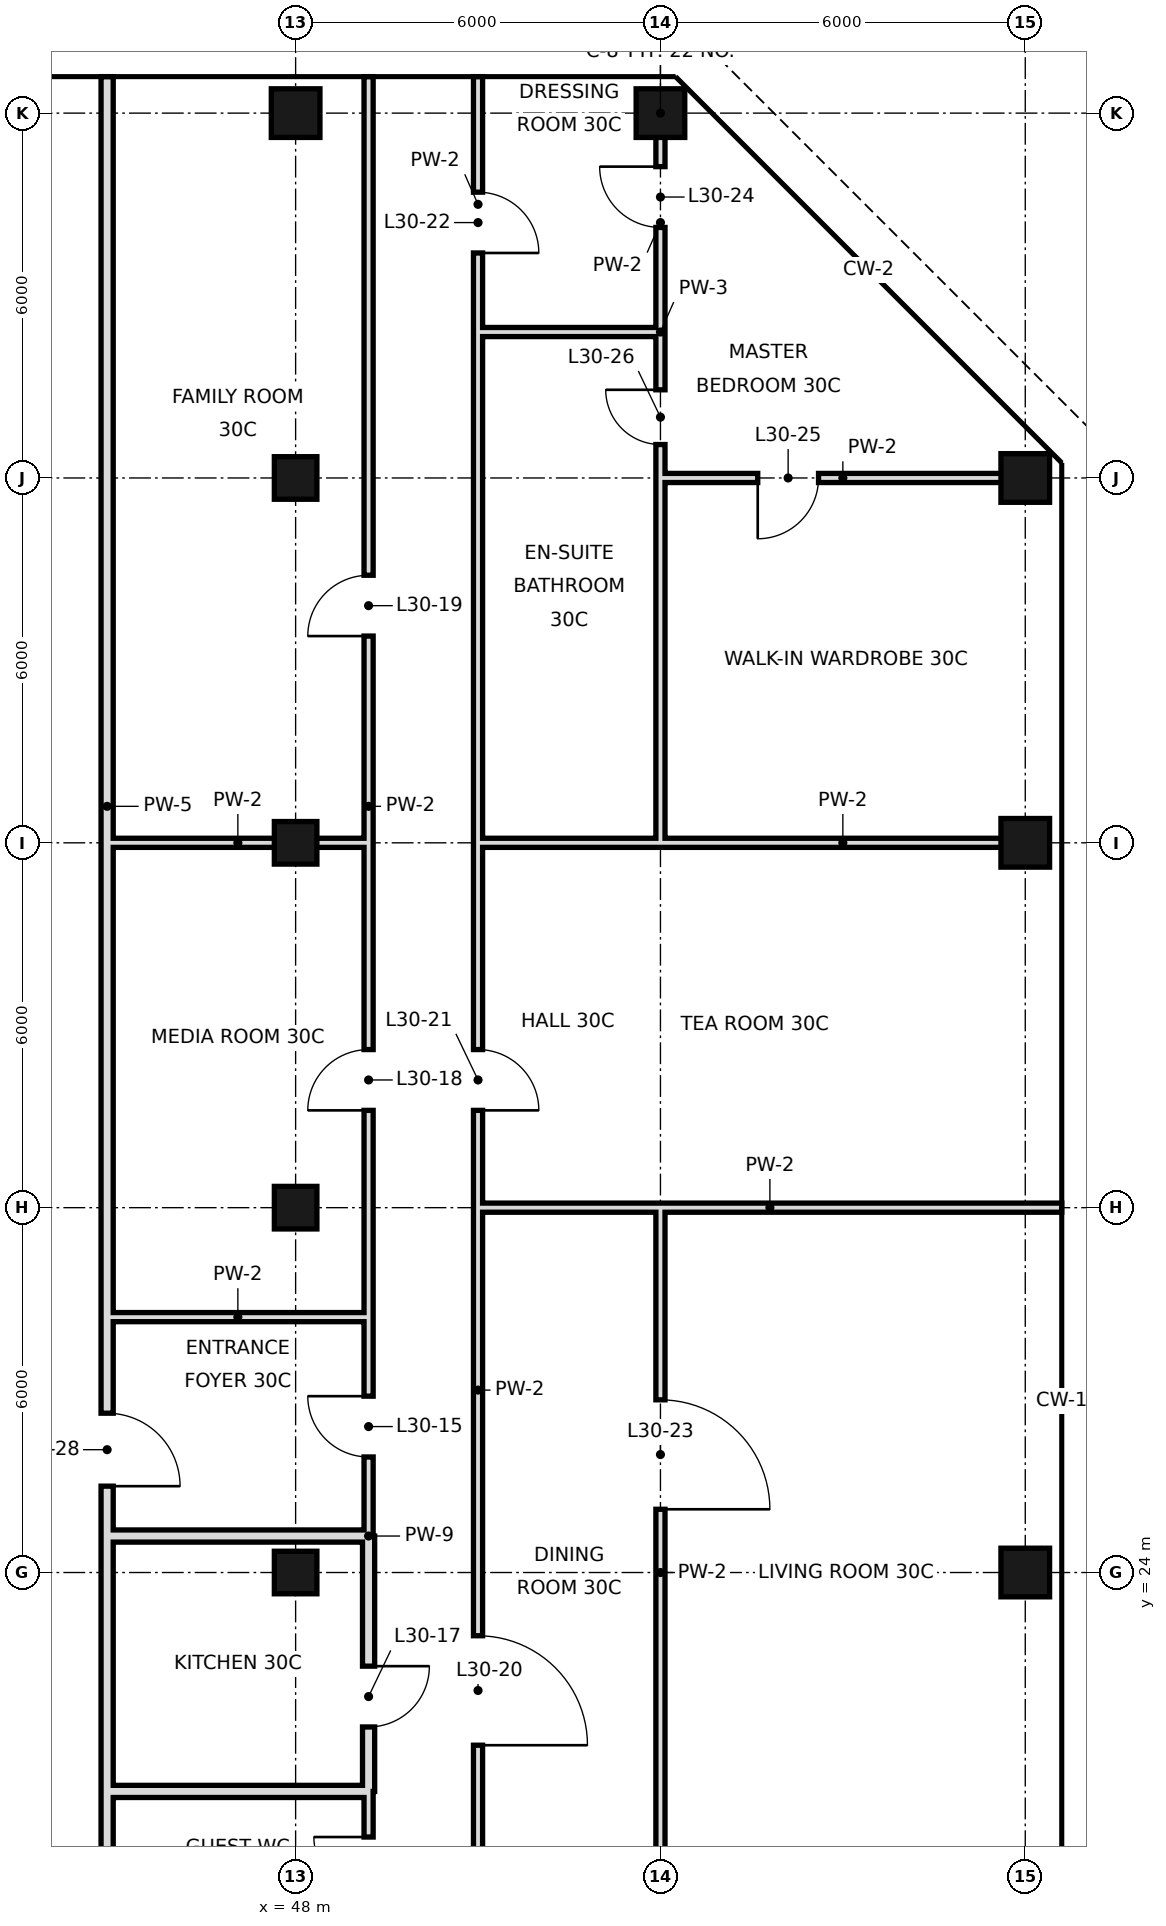
"""IFC4 building model, lengths in metres.
Left out: names, types, materials, properties, quantities, classifications, styles, units other than length and angle.
Written with IfcOpenShell. Run it as: python <this file> out.ifc"""

import sys

from ifc_helpers import new_model, si_unit, direction, frame, frame_2d, origin, origin_2d, place, context, subcontext, project, spatial, rectangle, hollow_rectangle, extrude, element, fill, save


model = new_model("IFC4")
c1 = context("Model", 3, precision=1e-05, world=origin(), true_north=direction((0.0, 1.0)))
c2 = subcontext(c1, "Body", "Model", "MODEL_VIEW")
j1 = project(units=[si_unit("LENGTHUNIT", "METRE"), si_unit("PLANEANGLEUNIT", "RADIAN")], contexts=[c1])
p1 = place(None, origin())
s1 = spatial("IfcSite", under=j1, at=p1, CompositionType="ELEMENT")
p2 = place(p1, origin())
s2 = spatial("IfcBuilding", under=s1, at=p2, CompositionType="ELEMENT")
p3 = place(p2, frame((0.0, 0.0, 134.0)))
s3 = spatial("IfcBuildingStorey", under=s2, at=p3, CompositionType="ELEMENT", Elevation=134.0)
for number, where, z_axis, x_axis in (
    (1, (48.0, 24.0, 0.0), (0.0, 0.0, 1.0), (1.0, 0.0, 0.0)),
    (2, (48.0, 30.0, 0.0), (0.0, 0.0, 1.0), (1.0, 0.0, 0.0)),
    (3, (48.0, 36.0, 0.0), (0.0, 0.0, 1.0), (1.0, 0.0, 0.0)),
    (4, (48.0, 42.0, 0.0), (0.0, 0.0, 1.0), (1.0, 0.0, 0.0)),
):
    element("IfcColumn", number, at=place(p3, frame(where, z_axis=z_axis, x_axis=x_axis)), inside=s3, PredefinedType="COLUMN", context=c2, shape_type="SweptSolid", body=[
        extrude(hollow_rectangle(XDim=0.7, YDim=0.7, WallThickness=0.036, at=origin_2d()), origin(), (0.0, 0.0, 1.0), 4.4),
    ])
for number, where, z_axis, x_axis in (
    (5, (48.0, 48.0, 0.0), (0.0, 0.0, 1.0), (1.0, 0.0, 0.0)),
    (6, (54.0, 48.0, 0.0), (0.0, 0.0, 1.0), (1.0, 0.0, 0.0)),
    (7, (60.0, 24.0, 0.0), (0.0, 0.0, 1.0), (1.0, 0.0, 0.0)),
    (8, (60.0, 36.0, 0.0), (0.0, 0.0, 1.0), (1.0, 0.0, 0.0)),
    (9, (60.0, 42.0, 0.0), (0.0, 0.0, 1.0), (1.0, 0.0, 0.0)),
):
    element("IfcColumn", number, at=place(p3, frame(where, z_axis=z_axis, x_axis=x_axis)), inside=s3, PredefinedType="COLUMN", context=c2, shape_type="SweptSolid", body=[
        extrude(hollow_rectangle(XDim=0.8, YDim=0.8, WallThickness=0.04, at=origin_2d()), origin(), (0.0, 0.0, 1.0), 4.4),
    ])
p4 = place(p3, frame((44.9, 18.002, 0.0), z_axis=(0.0, 0.0, 1.0), x_axis=(0.0, 1.0, 0.0)))
e10 = element("IfcWall", 10, at=p4, inside=s3, PredefinedType="SOLIDWALL", context=c2, shape_type="SweptSolid", body=[
    extrude(rectangle(XDim=2.398, YDim=0.2, at=frame_2d((1.199, 0.0))), origin(), (0.0, 0.0, 1.0), 4.1),
])
p5 = place(p3, frame((44.9, 24.6, 0.0), z_axis=(0.0, 0.0, 1.0), x_axis=(0.0, 1.0, 0.0)))
e11 = element("IfcWall", 11, at=p5, inside=s3, PredefinedType="SOLIDWALL", context=c2, shape_type="SweptSolid", body=[
    extrude(rectangle(XDim=24.0, YDim=0.2, at=frame_2d((12.0, 0.0))), origin(), (0.0, 0.0, 1.0), 3.4),
])
p6 = place(p5, frame((0.82, 0.0, 0.0)))
e12 = element("IfcOpeningElement", 12, at=p6, cuts=e11, PredefinedType="OPENING", context=c2, shape_type="SweptSolid", body=[
    extrude(rectangle(XDim=1.2, YDim=2.4, at=frame_2d((0.6, 1.2))), frame((0.0, 0.11, 0.0), z_axis=(0.0, -1.0, 0.0), x_axis=(1.0, 0.0, 0.0)), (0.0, 0.0, 1.0), 0.22),
])
p7 = place(p3, frame((44.9, 20.4, 0.0), z_axis=(0.0, 0.0, 1.0), x_axis=(0.0, 1.0, 0.0)))
e13 = element("IfcWall", 13, at=p7, inside=s3, PredefinedType="SOLIDWALL", context=c2, shape_type="SweptSolid", body=[
    extrude(rectangle(XDim=4.2, YDim=0.2, at=frame_2d((2.1, 0.0))), origin(), (0.0, 0.0, 1.0), 4.1),
])
p8 = place(p3, frame((49.2, 20.4, 0.0), z_axis=(0.0, 0.0, 1.0), x_axis=(0.0, 1.0, 0.0)))
e14 = element("IfcWall", 14, at=p8, inside=s3, PredefinedType="SOLIDWALL", context=c2, shape_type="SweptSolid", body=[
    extrude(rectangle(XDim=4.2, YDim=0.2, at=frame_2d((2.1, 0.0))), origin(), (0.0, 0.0, 1.0), 3.4),
])
p9 = place(p8, frame((1.06, 0.0, 0.0)))
e15 = element("IfcOpeningElement", 15, at=p9, cuts=e14, PredefinedType="OPENING", context=c2, shape_type="SweptSolid", body=[
    extrude(rectangle(XDim=1.0, YDim=2.4, at=frame_2d((0.5, 1.2))), frame((0.0, 0.11, 0.0), z_axis=(0.0, -1.0, 0.0), x_axis=(1.0, 0.0, 0.0)), (0.0, 0.0, 1.0), 0.22),
])
p10 = place(p3, frame((49.2, 24.6, 0.0), z_axis=(0.0, 0.0, 1.0), x_axis=(0.0, 1.0, 0.0)))
e16 = element("IfcWall", 16, at=p10, inside=s3, PredefinedType="PARTITIONING", context=c2, shape_type="SweptSolid", body=[
    extrude(rectangle(XDim=24.0, YDim=0.15, at=frame_2d((12.0, 0.0))), origin(), (0.0, 0.0, 1.0), 4.1),
])
p11 = place(p10, frame((1.3, 0.0, 0.0)))
e17 = element("IfcOpeningElement", 17, at=p11, cuts=e16, PredefinedType="OPENING", context=c2, shape_type="SweptSolid", body=[
    extrude(rectangle(XDim=1.0, YDim=2.4, at=frame_2d((0.5, 1.2))), frame((0.0, 0.085, 0.0), z_axis=(0.0, -1.0, 0.0), x_axis=(1.0, 0.0, 0.0)), (0.0, 0.0, 1.0), 0.17),
])
p12 = place(p10, frame((7.0, 0.0, 0.0)))
e18 = element("IfcOpeningElement", 18, at=p12, cuts=e16, PredefinedType="OPENING", context=c2, shape_type="SweptSolid", body=[
    extrude(rectangle(XDim=1.0, YDim=2.4, at=frame_2d((0.5, 1.2))), frame((0.0, 0.085, 0.0), z_axis=(0.0, -1.0, 0.0), x_axis=(1.0, 0.0, 0.0)), (0.0, 0.0, 1.0), 0.17),
])
p13 = place(p10, frame((14.8, 0.0, 0.0)))
e19 = element("IfcOpeningElement", 19, at=p13, cuts=e16, PredefinedType="OPENING", context=c2, shape_type="SweptSolid", body=[
    extrude(rectangle(XDim=1.0, YDim=2.4, at=frame_2d((0.5, 1.2))), frame((0.0, 0.085, 0.0), z_axis=(0.0, -1.0, 0.0), x_axis=(1.0, 0.0, 0.0)), (0.0, 0.0, 1.0), 0.17),
])
p14 = place(p3, frame((49.2, 18.0, 0.0), z_axis=(0.0, 0.0, 1.0), x_axis=(0.0, 1.0, 0.0)))
e20 = element("IfcWall", 20, at=p14, inside=s3, PredefinedType="PARTITIONING", context=c2, shape_type="SweptSolid", body=[
    extrude(rectangle(XDim=2.4, YDim=0.15, at=frame_2d((1.2, 0.0))), origin(), (0.0, 0.0, 1.0), 4.1),
])
p15 = place(p14, frame((0.75, 0.0, 0.0)))
e21 = element("IfcOpeningElement", 21, at=p15, cuts=e20, PredefinedType="OPENING", context=c2, shape_type="SweptSolid", body=[
    extrude(rectangle(XDim=0.9, YDim=2.4, at=frame_2d((0.45, 1.2))), frame((0.0, 0.085, 0.0), z_axis=(0.0, -1.0, 0.0), x_axis=(1.0, 0.0, 0.0)), (0.0, 0.0, 1.0), 0.17),
])
p16 = place(p3, frame((51.0, 18.0, 0.0), z_axis=(0.0, 0.0, 1.0), x_axis=(0.0, 1.0, 0.0)))
e22 = element("IfcWall", 22, at=p16, inside=s3, PredefinedType="PARTITIONING", context=c2, shape_type="SweptSolid", body=[
    extrude(rectangle(XDim=18.0, YDim=0.15, at=frame_2d((9.0, 0.0))), origin(), (0.0, 0.0, 1.0), 4.1),
])
p17 = place(p16, frame((3.16, 0.0, 0.0)))
e23 = element("IfcOpeningElement", 23, at=p17, cuts=e22, PredefinedType="OPENING", context=c2, shape_type="SweptSolid", body=[
    extrude(rectangle(XDim=1.8, YDim=2.4, at=frame_2d((0.9, 1.2))), frame((0.0, 0.085, 0.0), z_axis=(0.0, -1.0, 0.0), x_axis=(1.0, 0.0, 0.0)), (0.0, 0.0, 1.0), 0.17),
])
p18 = place(p16, frame((13.6, 0.0, 0.0)))
e24 = element("IfcOpeningElement", 24, at=p18, cuts=e22, PredefinedType="OPENING", context=c2, shape_type="SweptSolid", body=[
    extrude(rectangle(XDim=1.0, YDim=2.4, at=frame_2d((0.5, 1.2))), frame((0.0, 0.085, 0.0), z_axis=(0.0, -1.0, 0.0), x_axis=(1.0, 0.0, 0.0)), (0.0, 0.0, 1.0), 0.17),
])
p19 = place(p3, frame((51.0, 44.4, 0.0), z_axis=(0.0, 0.0, 1.0), x_axis=(0.0, 1.0, 0.0)))
e25 = element("IfcWall", 25, at=p19, inside=s3, PredefinedType="PARTITIONING", context=c2, shape_type="SweptSolid", body=[
    extrude(rectangle(XDim=4.2, YDim=0.15, at=frame_2d((2.1, 0.0))), origin(), (0.0, 0.0, 1.0), 4.1),
])
p20 = place(p19, frame((1.3, 0.0, 0.0)))
e26 = element("IfcOpeningElement", 26, at=p20, cuts=e25, PredefinedType="OPENING", context=c2, shape_type="SweptSolid", body=[
    extrude(rectangle(XDim=1.0, YDim=2.4, at=frame_2d((0.5, 1.2))), frame((0.0, 0.085, 0.0), z_axis=(0.0, -1.0, 0.0), x_axis=(1.0, 0.0, 0.0)), (0.0, 0.0, 1.0), 0.17),
])
p21 = place(p3, frame((51.0, 36.0, 0.0), z_axis=(0.0, 0.0, 1.0), x_axis=(0.0, 1.0, 0.0)))
e27 = element("IfcWall", 27, at=p21, inside=s3, PredefinedType="PARTITIONING", context=c2, shape_type="SweptSolid", body=[
    extrude(rectangle(XDim=8.4, YDim=0.15, at=frame_2d((4.2, 0.0))), origin(), (0.0, 0.0, 1.0), 4.1),
])
p22 = place(p3, frame((54.0, 18.0, 0.0), z_axis=(0.0, 0.0, 1.0), x_axis=(0.0, 1.0, 0.0)))
e28 = element("IfcWall", 28, at=p22, inside=s3, PredefinedType="PARTITIONING", context=c2, shape_type="SweptSolid", body=[
    extrude(rectangle(XDim=12.0, YDim=0.15, at=frame_2d((6.0, 0.0))), origin(), (0.0, 0.0, 1.0), 4.1),
])
p23 = place(p22, frame((7.04, 0.0, 0.0)))
e29 = element("IfcOpeningElement", 29, at=p23, cuts=e28, PredefinedType="OPENING", context=c2, shape_type="SweptSolid", body=[
    extrude(rectangle(XDim=1.8, YDim=2.4, at=frame_2d((0.9, 1.2))), frame((0.0, 0.085, 0.0), z_axis=(0.0, -1.0, 0.0), x_axis=(1.0, 0.0, 0.0)), (0.0, 0.0, 1.0), 0.17),
])
p24 = place(p3, frame((54.0, 44.4, 0.0), z_axis=(0.0, 0.0, 1.0), x_axis=(0.0, 1.0, 0.0)))
e30 = element("IfcWall", 30, at=p24, inside=s3, PredefinedType="PARTITIONING", context=c2, shape_type="SweptSolid", body=[
    extrude(rectangle(XDim=3.6, YDim=0.15, at=frame_2d((1.8, 0.0))), origin(), (0.0, 0.0, 1.0), 4.1),
])
p25 = place(p24, frame((1.72, 0.0, 0.0)))
e31 = element("IfcOpeningElement", 31, at=p25, cuts=e30, PredefinedType="OPENING", context=c2, shape_type="SweptSolid", body=[
    extrude(rectangle(XDim=1.0, YDim=2.4, at=frame_2d((0.5, 1.2))), frame((0.0, 0.085, 0.0), z_axis=(0.0, -1.0, 0.0), x_axis=(1.0, 0.0, 0.0)), (0.0, 0.0, 1.0), 0.17),
])
p26 = place(p3, frame((54.0, 36.0, 0.0), z_axis=(0.0, 0.0, 1.0), x_axis=(0.0, 1.0, 0.0)))
e32 = element("IfcWall", 32, at=p26, inside=s3, PredefinedType="PARTITIONING", context=c2, shape_type="SweptSolid", body=[
    extrude(rectangle(XDim=8.4, YDim=0.15, at=frame_2d((4.2, 0.0))), origin(), (0.0, 0.0, 1.0), 4.1),
])
p27 = place(p26, frame((6.55, 0.0, 0.0)))
e33 = element("IfcOpeningElement", 33, at=p27, cuts=e32, PredefinedType="OPENING", context=c2, shape_type="SweptSolid", body=[
    extrude(rectangle(XDim=0.9, YDim=2.4, at=frame_2d((0.45, 1.2))), frame((0.0, 0.085, 0.0), z_axis=(0.0, -1.0, 0.0), x_axis=(1.0, 0.0, 0.0)), (0.0, 0.0, 1.0), 0.17),
])
p28 = place(p3, frame((44.9, 20.4, 0.0), z_axis=(0.0, 0.0, 1.0), x_axis=(1.0, 0.0, 0.0)))
e34 = element("IfcWall", 34, at=p28, inside=s3, PredefinedType="SOLIDWALL", context=c2, shape_type="SweptSolid", body=[
    extrude(rectangle(XDim=4.3, YDim=0.2, at=frame_2d((2.15, 0.0))), origin(), (0.0, 0.0, 1.0), 3.4),
])
p29 = place(p3, frame((44.9, 24.6, 0.0), z_axis=(0.0, 0.0, 1.0), x_axis=(1.0, 0.0, 0.0)))
e35 = element("IfcWall", 35, at=p29, inside=s3, PredefinedType="SOLIDWALL", context=c2, shape_type="SweptSolid", body=[
    extrude(rectangle(XDim=4.3, YDim=0.2, at=frame_2d((2.15, 0.0))), origin(), (0.0, 0.0, 1.0), 3.65),
])
p30 = place(p3, frame((44.9, 28.2, 0.0), z_axis=(0.0, 0.0, 1.0), x_axis=(1.0, 0.0, 0.0)))
e36 = element("IfcWall", 36, at=p30, inside=s3, PredefinedType="PARTITIONING", context=c2, shape_type="SweptSolid", body=[
    extrude(rectangle(XDim=4.3, YDim=0.15, at=frame_2d((2.15, 0.0))), origin(), (0.0, 0.0, 1.0), 4.1),
])
p31 = place(p3, frame((51.0, 30.0, 0.0), z_axis=(0.0, 0.0, 1.0), x_axis=(1.0, 0.0, 0.0)))
e37 = element("IfcWall", 37, at=p31, inside=s3, PredefinedType="PARTITIONING", context=c2, shape_type="SweptSolid", body=[
    extrude(rectangle(XDim=9.6, YDim=0.15, at=frame_2d((4.8, 0.0))), origin(), (0.0, 0.0, 1.0), 3.4),
])
p32 = place(p3, frame((44.9, 36.0, 0.0), z_axis=(0.0, 0.0, 1.0), x_axis=(1.0, 0.0, 0.0)))
e38 = element("IfcWall", 38, at=p32, inside=s3, PredefinedType="PARTITIONING", context=c2, shape_type="SweptSolid", body=[
    extrude(rectangle(XDim=4.3, YDim=0.15, at=frame_2d((2.15, 0.0))), origin(), (0.0, 0.0, 1.0), 3.4),
])
p33 = place(p3, frame((54.0, 36.0, 0.0), z_axis=(0.0, 0.0, 1.0), x_axis=(1.0, 0.0, 0.0)))
e39 = element("IfcWall", 39, at=p33, inside=s3, PredefinedType="PARTITIONING", context=c2, shape_type="SweptSolid", body=[
    extrude(rectangle(XDim=6.0, YDim=0.15, at=frame_2d((3.0, 0.0))), origin(), (0.0, 0.0, 1.0), 3.4),
])
p34 = place(p3, frame((51.0, 36.0, 0.0), z_axis=(0.0, 0.0, 1.0), x_axis=(1.0, 0.0, 0.0)))
e40 = element("IfcWall", 40, at=p34, inside=s3, PredefinedType="PARTITIONING", context=c2, shape_type="SweptSolid", body=[
    extrude(rectangle(XDim=3.0, YDim=0.15, at=frame_2d((1.5, 0.0))), origin(), (0.0, 0.0, 1.0), 3.4),
])
p35 = place(p3, frame((54.0, 42.0, 0.0), z_axis=(0.0, 0.0, 1.0), x_axis=(1.0, 0.0, 0.0)))
e41 = element("IfcWall", 41, at=p35, inside=s3, PredefinedType="PARTITIONING", context=c2, shape_type="SweptSolid", body=[
    extrude(rectangle(XDim=6.0, YDim=0.15, at=frame_2d((3.0, 0.0))), origin(), (0.0, 0.0, 1.0), 3.4),
])
p36 = place(p35, frame((1.6, 0.0, 0.0)))
e42 = element("IfcOpeningElement", 42, at=p36, cuts=e41, PredefinedType="OPENING", context=c2, shape_type="SweptSolid", body=[
    extrude(rectangle(XDim=1.0, YDim=2.4, at=frame_2d((0.5, 1.2))), frame((0.0, 0.085, 0.0), z_axis=(0.0, -1.0, 0.0), x_axis=(1.0, 0.0, 0.0)), (0.0, 0.0, 1.0), 0.17),
])
p37 = place(p3, frame((51.0, 44.4, 0.0), z_axis=(0.0, 0.0, 1.0), x_axis=(1.0, 0.0, 0.0)))
e43 = element("IfcWall", 43, at=p37, inside=s3, PredefinedType="PARTITIONING", context=c2, shape_type="SweptSolid", body=[
    extrude(rectangle(XDim=3.0, YDim=0.15, at=frame_2d((1.5, 0.0))), origin(), (0.0, 0.0, 1.0), 4.1),
])
p38 = place(p11, frame((1.0, 0.0, 0.0), z_axis=(0.0, 0.0, 1.0), x_axis=(-1.0, 0.0, 0.0)))
e44 = element("IfcDoor", 44, at=p38, inside=s3, OperationType="SINGLE_SWING_LEFT", PredefinedType="DOOR", context=c2, shape_type="SweptSolid", body=[
    extrude(rectangle(XDim=1.0, YDim=2.4, at=frame_2d((0.5, 1.2))), frame((0.0, 0.025, 0.0), z_axis=(0.0, -1.0, 0.0), x_axis=(1.0, 0.0, 0.0)), (0.0, 0.0, 1.0), 0.05),
])
fill(e17, e44)
p39 = place(p15, frame((0.9, 0.0, 0.0), z_axis=(0.0, 0.0, 1.0), x_axis=(-1.0, 0.0, 0.0)))
e45 = element("IfcDoor", 45, at=p39, inside=s3, OperationType="SINGLE_SWING_LEFT", PredefinedType="DOOR", context=c2, shape_type="SweptSolid", body=[
    extrude(rectangle(XDim=0.9, YDim=2.4, at=frame_2d((0.45, 1.2))), frame((0.0, 0.025, 0.0), z_axis=(0.0, -1.0, 0.0), x_axis=(1.0, 0.0, 0.0)), (0.0, 0.0, 1.0), 0.05),
])
fill(e21, e45)
p40 = place(p9, origin())
e46 = element("IfcDoor", 46, at=p40, inside=s3, OperationType="SINGLE_SWING_RIGHT", PredefinedType="DOOR", context=c2, shape_type="SweptSolid", body=[
    extrude(rectangle(XDim=1.0, YDim=2.4, at=frame_2d((0.5, 1.2))), frame((0.0, 0.025, 0.0), z_axis=(0.0, -1.0, 0.0), x_axis=(1.0, 0.0, 0.0)), (0.0, 0.0, 1.0), 0.05),
])
fill(e15, e46)
p41 = place(p12, origin())
e47 = element("IfcDoor", 47, at=p41, inside=s3, OperationType="SINGLE_SWING_LEFT", PredefinedType="DOOR", context=c2, shape_type="SweptSolid", body=[
    extrude(rectangle(XDim=1.0, YDim=2.4, at=frame_2d((0.5, 1.2))), frame((0.0, 0.025, 0.0), z_axis=(0.0, -1.0, 0.0), x_axis=(1.0, 0.0, 0.0)), (0.0, 0.0, 1.0), 0.05),
])
fill(e18, e47)
p42 = place(p13, origin())
e48 = element("IfcDoor", 48, at=p42, inside=s3, OperationType="SINGLE_SWING_LEFT", PredefinedType="DOOR", context=c2, shape_type="SweptSolid", body=[
    extrude(rectangle(XDim=1.0, YDim=2.4, at=frame_2d((0.5, 1.2))), frame((0.0, 0.025, 0.0), z_axis=(0.0, -1.0, 0.0), x_axis=(1.0, 0.0, 0.0)), (0.0, 0.0, 1.0), 0.05),
])
fill(e19, e48)
p43 = place(p17, frame((1.8, 0.0, 0.0), z_axis=(0.0, 0.0, 1.0), x_axis=(-1.0, 0.0, 0.0)))
e49 = element("IfcDoor", 49, at=p43, inside=s3, OperationType="SINGLE_SWING_RIGHT", PredefinedType="DOOR", context=c2, shape_type="SweptSolid", body=[
    extrude(rectangle(XDim=1.8, YDim=2.4, at=frame_2d((0.9, 1.2))), frame((0.0, 0.025, 0.0), z_axis=(0.0, -1.0, 0.0), x_axis=(1.0, 0.0, 0.0)), (0.0, 0.0, 1.0), 0.05),
])
fill(e23, e49)
p44 = place(p18, frame((1.0, 0.0, 0.0), z_axis=(0.0, 0.0, 1.0), x_axis=(-1.0, 0.0, 0.0)))
e50 = element("IfcDoor", 50, at=p44, inside=s3, OperationType="SINGLE_SWING_RIGHT", PredefinedType="DOOR", context=c2, shape_type="SweptSolid", body=[
    extrude(rectangle(XDim=1.0, YDim=2.4, at=frame_2d((0.5, 1.2))), frame((0.0, 0.025, 0.0), z_axis=(0.0, -1.0, 0.0), x_axis=(1.0, 0.0, 0.0)), (0.0, 0.0, 1.0), 0.05),
])
fill(e24, e50)
p45 = place(p20, frame((1.0, 0.0, 0.0), z_axis=(0.0, 0.0, 1.0), x_axis=(-1.0, 0.0, 0.0)))
e51 = element("IfcDoor", 51, at=p45, inside=s3, OperationType="SINGLE_SWING_RIGHT", PredefinedType="DOOR", context=c2, shape_type="SweptSolid", body=[
    extrude(rectangle(XDim=1.0, YDim=2.4, at=frame_2d((0.5, 1.2))), frame((0.0, 0.025, 0.0), z_axis=(0.0, -1.0, 0.0), x_axis=(1.0, 0.0, 0.0)), (0.0, 0.0, 1.0), 0.05),
])
fill(e26, e51)
p46 = place(p23, frame((1.8, 0.0, 0.0), z_axis=(0.0, 0.0, 1.0), x_axis=(-1.0, 0.0, 0.0)))
e52 = element("IfcDoor", 52, at=p46, inside=s3, OperationType="SINGLE_SWING_RIGHT", PredefinedType="DOOR", context=c2, shape_type="SweptSolid", body=[
    extrude(rectangle(XDim=1.8, YDim=2.4, at=frame_2d((0.9, 1.2))), frame((0.0, 0.025, 0.0), z_axis=(0.0, -1.0, 0.0), x_axis=(1.0, 0.0, 0.0)), (0.0, 0.0, 1.0), 0.05),
])
fill(e29, e52)
p47 = place(p25, frame((1.0, 0.0, 0.0), z_axis=(0.0, 0.0, 1.0), x_axis=(-1.0, 0.0, 0.0)))
e53 = element("IfcDoor", 53, at=p47, inside=s3, OperationType="SINGLE_SWING_LEFT", PredefinedType="DOOR", context=c2, shape_type="SweptSolid", body=[
    extrude(rectangle(XDim=1.0, YDim=2.4, at=frame_2d((0.5, 1.2))), frame((0.0, 0.025, 0.0), z_axis=(0.0, -1.0, 0.0), x_axis=(1.0, 0.0, 0.0)), (0.0, 0.0, 1.0), 0.05),
])
fill(e31, e53)
p48 = place(p36, frame((1.0, 0.0, 0.0), z_axis=(0.0, 0.0, 1.0), x_axis=(-1.0, 0.0, 0.0)))
e54 = element("IfcDoor", 54, at=p48, inside=s3, OperationType="SINGLE_SWING_RIGHT", PredefinedType="DOOR", context=c2, shape_type="SweptSolid", body=[
    extrude(rectangle(XDim=1.0, YDim=2.4, at=frame_2d((0.5, 1.2))), frame((0.0, 0.025, 0.0), z_axis=(0.0, -1.0, 0.0), x_axis=(1.0, 0.0, 0.0)), (0.0, 0.0, 1.0), 0.05),
])
fill(e42, e54)
p49 = place(p27, frame((0.9, 0.0, 0.0), z_axis=(0.0, 0.0, 1.0), x_axis=(-1.0, 0.0, 0.0)))
e55 = element("IfcDoor", 55, at=p49, inside=s3, OperationType="SINGLE_SWING_LEFT", PredefinedType="DOOR", context=c2, shape_type="SweptSolid", body=[
    extrude(rectangle(XDim=0.9, YDim=2.4, at=frame_2d((0.45, 1.2))), frame((0.0, 0.025, 0.0), z_axis=(0.0, -1.0, 0.0), x_axis=(1.0, 0.0, 0.0)), (0.0, 0.0, 1.0), 0.05),
])
fill(e33, e55)
p50 = place(p6, frame((1.2, 0.0, 0.0), z_axis=(0.0, 0.0, 1.0), x_axis=(-1.0, 0.0, 0.0)))
e56 = element("IfcDoor", 56, at=p50, inside=s3, OperationType="SINGLE_SWING_RIGHT", PredefinedType="DOOR", context=c2, shape_type="SweptSolid", body=[
    extrude(rectangle(XDim=1.2, YDim=2.4, at=frame_2d((0.6, 1.2))), frame((0.0, 0.025, 0.0), z_axis=(0.0, -1.0, 0.0), x_axis=(1.0, 0.0, 0.0)), (0.0, 0.0, 1.0), 0.05),
])
fill(e12, e56)
save(model, sys.argv[1])
